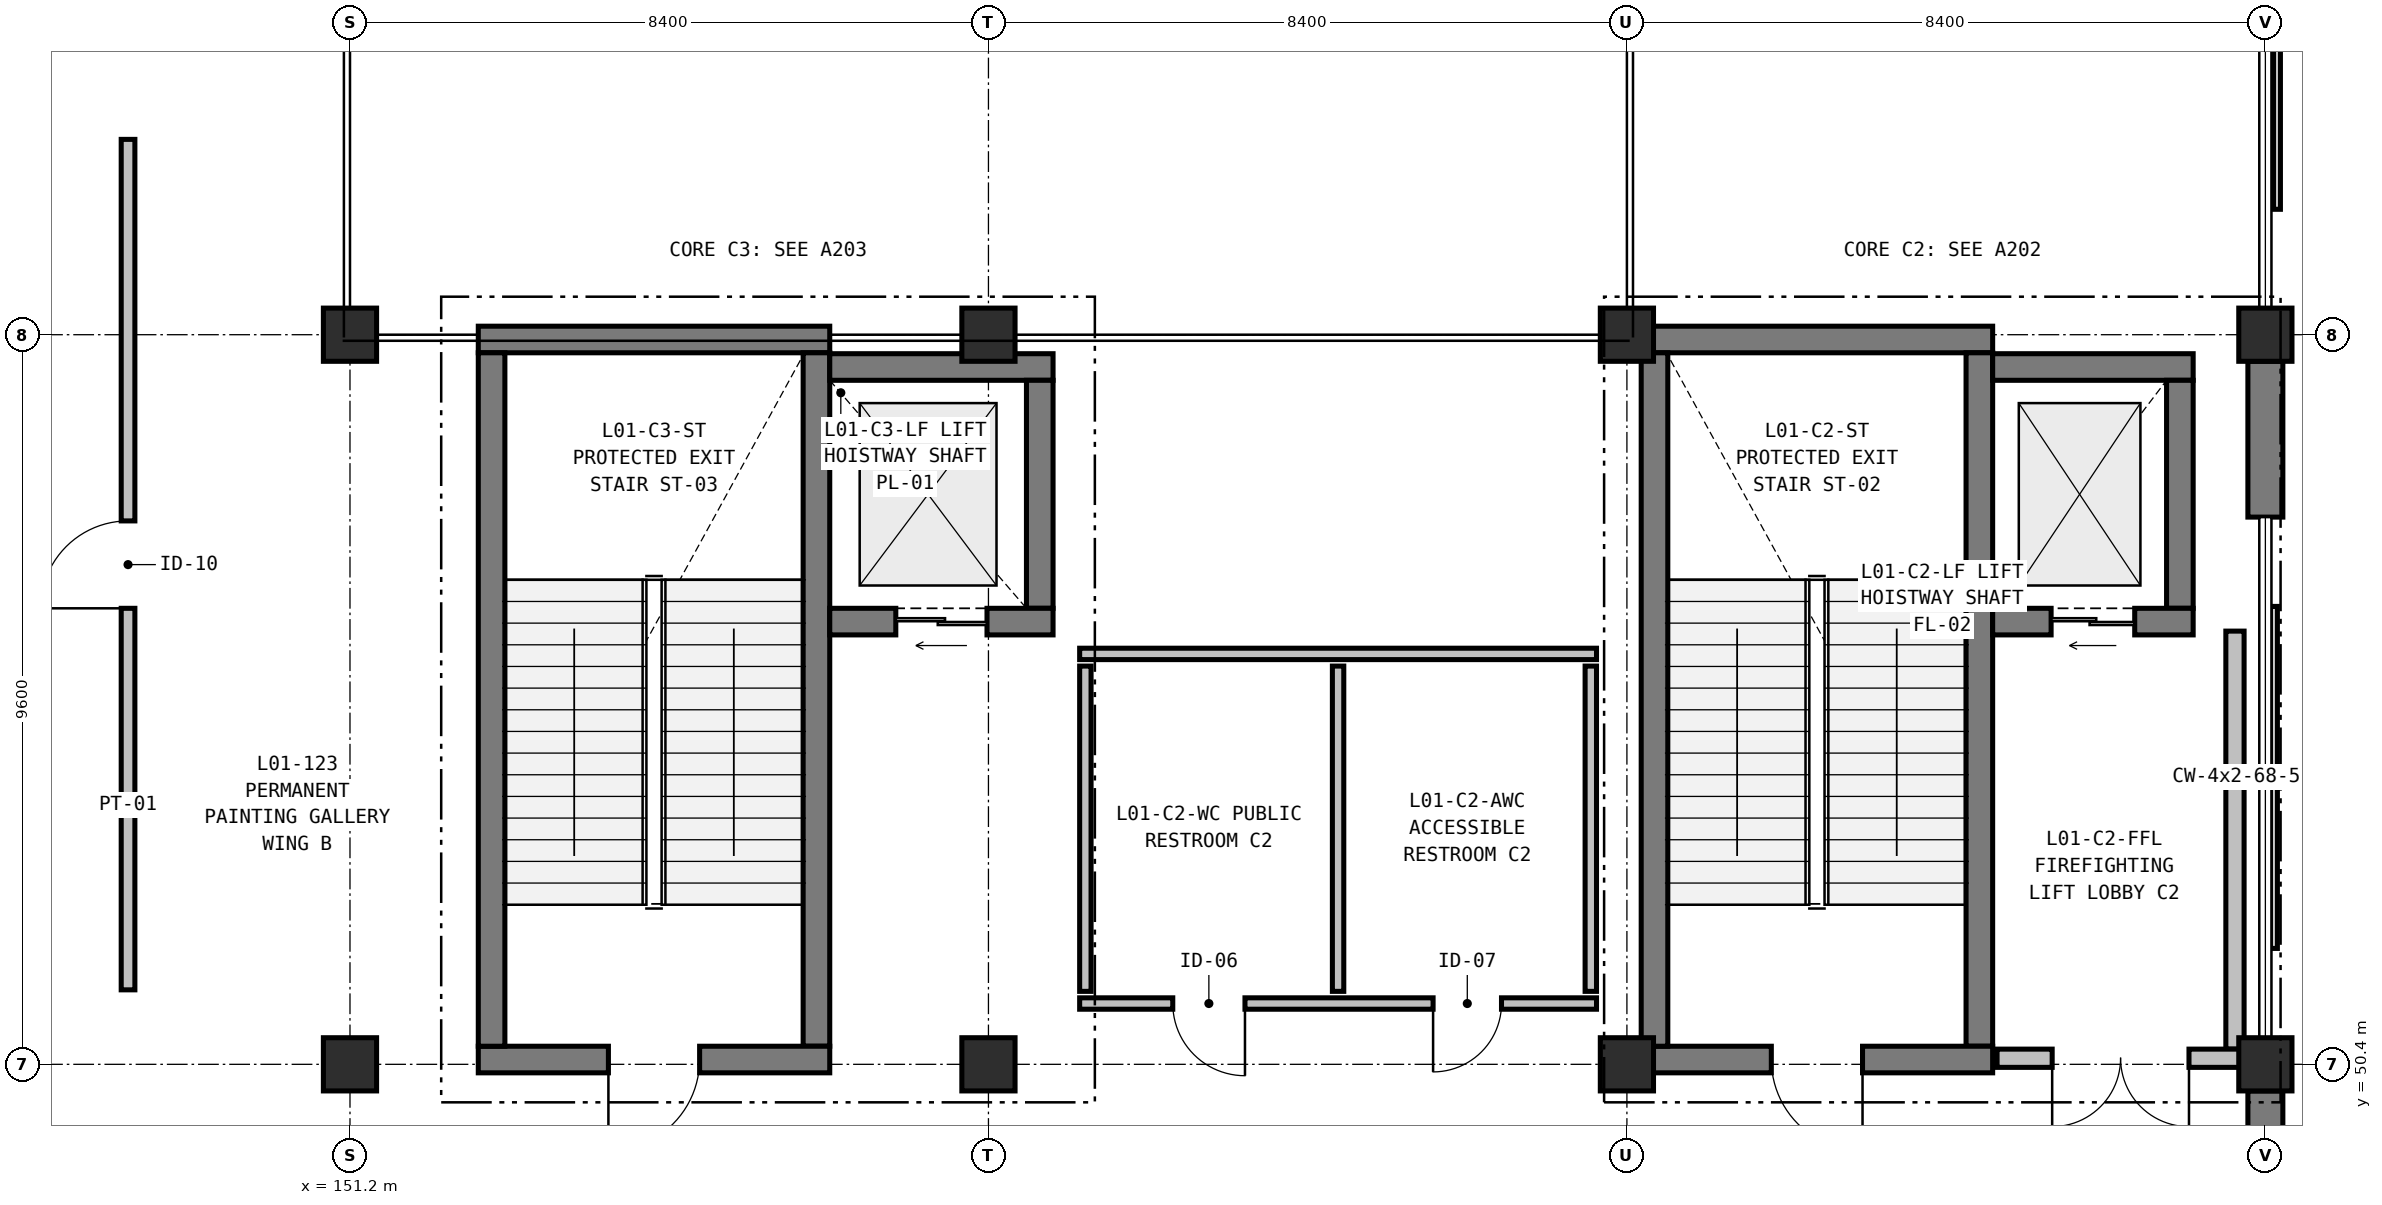
"""IFC4 building model, lengths in metres.
Left out: names, types, materials, properties, quantities, classifications, styles, units other than length and angle.
Written with IfcOpenShell. Run it as: python <this file> out.ifc"""

import sys

from ifc_helpers import new_model, si_unit, direction, frame, frame_2d, origin, origin_2d, place, context, subcontext, project, spatial, rectangle, extrude, element, fill, save


model = new_model("IFC4")
c1 = context("Model", 3, precision=1e-05, world=origin(), true_north=direction((0.0, 1.0)))
c2 = subcontext(c1, "Body", "Model", "MODEL_VIEW")
j1 = project(units=[si_unit("LENGTHUNIT", "METRE"), si_unit("PLANEANGLEUNIT", "RADIAN")], contexts=[c1])
p1 = place(None, origin())
s1 = spatial("IfcSite", under=j1, at=p1, CompositionType="ELEMENT")
p2 = place(p1, origin())
s2 = spatial("IfcBuilding", under=s1, at=p2, CompositionType="ELEMENT")
p3 = place(p2, frame((0.0, 0.0, 6.0)))
s3 = spatial("IfcBuildingStorey", under=s2, at=p3, CompositionType="ELEMENT", Elevation=6.0)
for number, where, z_axis, x_axis in (
    (1, (151.2, 50.4, 0.0), (0.0, 0.0, 1.0), (1.0, 0.0, 0.0)),
    (2, (151.2, 60.0, 0.0), (0.0, 0.0, 1.0), (1.0, 0.0, 0.0)),
    (3, (159.6, 50.4, 0.0), (0.0, 0.0, 1.0), (1.0, 0.0, 0.0)),
    (4, (159.6, 60.0, 0.0), (0.0, 0.0, 1.0), (1.0, 0.0, 0.0)),
    (5, (168.0, 50.4, 0.0), (0.0, 0.0, 1.0), (1.0, 0.0, 0.0)),
    (6, (168.0, 60.0, 0.0), (0.0, 0.0, 1.0), (1.0, 0.0, 0.0)),
    (7, (176.4, 50.4, 0.0), (0.0, 0.0, 1.0), (1.0, 0.0, 0.0)),
    (8, (176.4, 60.0, 0.0), (0.0, 0.0, 1.0), (1.0, 0.0, 0.0)),
):
    element("IfcColumn", number, at=place(p3, frame(where, z_axis=z_axis, x_axis=x_axis)), inside=s3, PredefinedType="COLUMN", context=c2, shape_type="SweptSolid", body=[
        extrude(rectangle(XDim=0.7, YDim=0.7, at=origin_2d()), origin(), (0.0, 0.0, 1.0), 5.4),
    ])
p4 = place(p3, frame((176.4, 59.65, 0.0), z_axis=(0.0, 0.0, 1.0), x_axis=(0.0, -1.0, 0.0)))
e9 = element("IfcWall", 9, at=p4, inside=s3, PredefinedType="SOLIDWALL", context=c2, shape_type="SweptSolid", body=[
    extrude(rectangle(XDim=2.05, YDim=0.46, at=frame_2d((1.025, 0.0))), origin(), (0.0, 0.0, 1.0), 5.08),
])
p5 = place(p3, frame((176.4, 50.05, 0.0), z_axis=(0.0, 0.0, 1.0), x_axis=(0.0, -1.0, 0.0)))
e10 = element("IfcWall", 10, at=p5, inside=s3, PredefinedType="SOLIDWALL", context=c2, shape_type="SweptSolid", body=[
    extrude(rectangle(XDim=4.1, YDim=0.46, at=frame_2d((2.05, 0.0))), origin(), (0.0, 0.0, 1.0), 5.08),
])
p6 = place(p3, frame((168.188, 59.937, 0.0), z_axis=(0.0, 0.0, 1.0), x_axis=(1.0, 0.0, 0.0)))
e11 = element("IfcWall", 11, at=p6, inside=s3, PredefinedType="SHEAR", context=c2, shape_type="SweptSolid", body=[
    extrude(rectangle(XDim=4.624, YDim=0.35, at=frame_2d((2.312, 0.0))), origin(), (0.0, 0.0, 1.0), 5.08),
])
p7 = place(p3, frame((172.637, 59.762, 0.0), z_axis=(0.0, 0.0, 1.0), x_axis=(0.0, -1.0, 0.0)))
e12 = element("IfcWall", 12, at=p7, inside=s3, PredefinedType="SHEAR", context=c2, shape_type="SweptSolid", body=[
    extrude(rectangle(XDim=9.124, YDim=0.35, at=frame_2d((4.562, 0.0))), origin(), (0.0, 0.0, 1.0), 5.08),
])
p8 = place(p3, frame((172.812, 50.463, 0.0), z_axis=(0.0, 0.0, 1.0), x_axis=(-1.0, 0.0, 0.0)))
e13 = element("IfcWall", 13, at=p8, inside=s3, PredefinedType="SHEAR", context=c2, shape_type="SweptSolid", body=[
    extrude(rectangle(XDim=4.624, YDim=0.35, at=frame_2d((2.312, 0.0))), origin(), (0.0, 0.0, 1.0), 5.08),
])
p9 = place(p8, frame((1.712, 0.0, 0.0)))
e14 = element("IfcOpeningElement", 14, at=p9, cuts=e13, PredefinedType="OPENING", context=c2, shape_type="SweptSolid", body=[
    extrude(rectangle(XDim=1.2, YDim=2.2, at=frame_2d((0.6, 1.1))), frame((0.0, 0.185, 0.0), z_axis=(0.0, -1.0, 0.0), x_axis=(1.0, 0.0, 0.0)), (0.0, 0.0, 1.0), 0.37),
])
p10 = place(p3, frame((168.363, 50.638, 0.0), z_axis=(0.0, 0.0, 1.0), x_axis=(0.0, 1.0, 0.0)))
e15 = element("IfcWall", 15, at=p10, inside=s3, PredefinedType="SHEAR", context=c2, shape_type="SweptSolid", body=[
    extrude(rectangle(XDim=9.124, YDim=0.35, at=frame_2d((4.562, 0.0))), origin(), (0.0, 0.0, 1.0), 5.08),
])
p11 = place(p3, frame((172.812, 59.575, 0.0), z_axis=(0.0, 0.0, 1.0), x_axis=(1.0, 0.0, 0.0)))
e16 = element("IfcWall", 16, at=p11, inside=s3, PredefinedType="SHEAR", context=c2, shape_type="SweptSolid", body=[
    extrude(rectangle(XDim=2.638, YDim=0.35, at=frame_2d((1.319, 0.0))), origin(), (0.0, 0.0, 1.0), 5.08),
])
p12 = place(p3, frame((175.275, 59.4, 0.0), z_axis=(0.0, 0.0, 1.0), x_axis=(0.0, -1.0, 0.0)))
e17 = element("IfcWall", 17, at=p12, inside=s3, PredefinedType="SHEAR", context=c2, shape_type="SweptSolid", body=[
    extrude(rectangle(XDim=3.0, YDim=0.35, at=frame_2d((1.5, 0.0))), origin(), (0.0, 0.0, 1.0), 5.08),
])
p13 = place(p3, frame((175.45, 56.225, 0.0), z_axis=(0.0, 0.0, 1.0), x_axis=(-1.0, 0.0, 0.0)))
e18 = element("IfcWall", 18, at=p13, inside=s3, PredefinedType="SHEAR", context=c2, shape_type="SweptSolid", body=[
    extrude(rectangle(XDim=2.638, YDim=0.35, at=frame_2d((1.319, 0.0))), origin(), (0.0, 0.0, 1.0), 5.08),
])
p14 = place(p13, frame((0.769, 0.0, 0.0)))
e19 = element("IfcOpeningElement", 19, at=p14, cuts=e18, PredefinedType="OPENING", context=c2, shape_type="SweptSolid", body=[
    extrude(rectangle(XDim=1.1, YDim=2.2, at=frame_2d((0.55, 1.1))), frame((0.0, 0.185, 0.0), z_axis=(0.0, -1.0, 0.0), x_axis=(1.0, 0.0, 0.0)), (0.0, 0.0, 1.0), 0.37),
])
p15 = place(p3, frame((176.0, 56.1, 0.0), z_axis=(0.0, 0.0, 1.0), x_axis=(0.0, -1.0, 0.0)))
e20 = element("IfcWall", 20, at=p15, inside=s3, PredefinedType="PARTITIONING", context=c2, shape_type="SweptSolid", body=[
    extrude(rectangle(XDim=5.5, YDim=0.24, at=frame_2d((2.75, 0.0))), origin(), (0.0, 0.0, 1.0), 4.405),
])
p16 = place(p3, frame((176.12, 50.48, 0.0), z_axis=(0.0, 0.0, 1.0), x_axis=(-1.0, 0.0, 0.0)))
e21 = element("IfcWall", 21, at=p16, inside=s3, PredefinedType="PARTITIONING", context=c2, shape_type="SweptSolid", body=[
    extrude(rectangle(XDim=3.25, YDim=0.24, at=frame_2d((1.625, 0.0))), origin(), (0.0, 0.0, 1.0), 4.405),
])
p17 = place(p16, frame((0.725, 0.0, 0.0)))
e22 = element("IfcOpeningElement", 22, at=p17, cuts=e21, PredefinedType="OPENING", context=c2, shape_type="SweptSolid", body=[
    extrude(rectangle(XDim=1.8, YDim=2.25, at=frame_2d((0.9, 1.125))), frame((0.0, 0.13, 0.0), z_axis=(0.0, -1.0, 0.0), x_axis=(1.0, 0.0, 0.0)), (0.0, 0.0, 1.0), 0.26),
])
p18 = place(p3, frame((167.6, 51.2, 0.0), z_axis=(0.0, 0.0, 1.0), x_axis=(-1.0, 0.0, 0.0)))
e23 = element("IfcWall", 23, at=p18, inside=s3, PredefinedType="PARTITIONING", context=c2, shape_type="SweptSolid", body=[
    extrude(rectangle(XDim=6.8, YDim=0.15, at=frame_2d((3.4, 0.0))), origin(), (0.0, 0.0, 1.0), 5.08),
])
p19 = place(p18, frame((1.25, 0.0, 0.0)))
e24 = element("IfcOpeningElement", 24, at=p19, cuts=e23, PredefinedType="OPENING", context=c2, shape_type="SweptSolid", body=[
    extrude(rectangle(XDim=0.9, YDim=2.1, at=frame_2d((0.45, 1.05))), frame((0.0, 0.085, 0.0), z_axis=(0.0, -1.0, 0.0), x_axis=(1.0, 0.0, 0.0)), (0.0, 0.0, 1.0), 0.17),
])
p20 = place(p18, frame((4.625, 0.0, 0.0)))
e25 = element("IfcOpeningElement", 25, at=p20, cuts=e23, PredefinedType="OPENING", context=c2, shape_type="SweptSolid", body=[
    extrude(rectangle(XDim=0.95, YDim=2.15, at=frame_2d((0.475, 1.075))), frame((0.0, 0.085, 0.0), z_axis=(0.0, -1.0, 0.0), x_axis=(1.0, 0.0, 0.0)), (0.0, 0.0, 1.0), 0.17),
])
p21 = place(p3, frame((160.8, 55.8, 0.0), z_axis=(0.0, 0.0, 1.0), x_axis=(1.0, 0.0, 0.0)))
e26 = element("IfcWall", 26, at=p21, inside=s3, PredefinedType="PARTITIONING", context=c2, shape_type="SweptSolid", body=[
    extrude(rectangle(XDim=6.8, YDim=0.15, at=frame_2d((3.4, 0.0))), origin(), (0.0, 0.0, 1.0), 5.08),
])
for number, where, z_axis, x_axis in (
    (27, (160.875, 51.36, 0.0), (0.0, 0.0, 1.0), (0.0, 1.0, 0.0)),
    (28, (164.2, 51.36, 0.0), (0.0, 0.0, 1.0), (0.0, 1.0, 0.0)),
    (29, (167.525, 51.36, 0.0), (0.0, 0.0, 1.0), (0.0, 1.0, 0.0)),
):
    element("IfcWall", number, at=place(p3, frame(where, z_axis=z_axis, x_axis=x_axis)), inside=s3, PredefinedType="PARTITIONING", context=c2, shape_type="SweptSolid", body=[
        extrude(rectangle(XDim=4.28, YDim=0.15, at=frame_2d((2.14, 0.0))), origin(), (0.0, 0.0, 1.0), 5.08),
    ])
p22 = place(p3, frame((152.888, 59.937, 0.0), z_axis=(0.0, 0.0, 1.0), x_axis=(1.0, 0.0, 0.0)))
e30 = element("IfcWall", 30, at=p22, inside=s3, PredefinedType="SHEAR", context=c2, shape_type="SweptSolid", body=[
    extrude(rectangle(XDim=4.624, YDim=0.35, at=frame_2d((2.312, 0.0))), origin(), (0.0, 0.0, 1.0), 5.08),
])
p23 = place(p3, frame((157.337, 59.762, 0.0), z_axis=(0.0, 0.0, 1.0), x_axis=(0.0, -1.0, 0.0)))
e31 = element("IfcWall", 31, at=p23, inside=s3, PredefinedType="SHEAR", context=c2, shape_type="SweptSolid", body=[
    extrude(rectangle(XDim=9.124, YDim=0.35, at=frame_2d((4.562, 0.0))), origin(), (0.0, 0.0, 1.0), 5.08),
])
p24 = place(p3, frame((157.512, 50.463, 0.0), z_axis=(0.0, 0.0, 1.0), x_axis=(-1.0, 0.0, 0.0)))
e32 = element("IfcWall", 32, at=p24, inside=s3, PredefinedType="SHEAR", context=c2, shape_type="SweptSolid", body=[
    extrude(rectangle(XDim=4.624, YDim=0.35, at=frame_2d((2.312, 0.0))), origin(), (0.0, 0.0, 1.0), 5.08),
])
p25 = place(p24, frame((1.712, 0.0, 0.0)))
e33 = element("IfcOpeningElement", 33, at=p25, cuts=e32, PredefinedType="OPENING", context=c2, shape_type="SweptSolid", body=[
    extrude(rectangle(XDim=1.2, YDim=2.2, at=frame_2d((0.6, 1.1))), frame((0.0, 0.185, 0.0), z_axis=(0.0, -1.0, 0.0), x_axis=(1.0, 0.0, 0.0)), (0.0, 0.0, 1.0), 0.37),
])
p26 = place(p3, frame((153.063, 50.638, 0.0), z_axis=(0.0, 0.0, 1.0), x_axis=(0.0, 1.0, 0.0)))
e34 = element("IfcWall", 34, at=p26, inside=s3, PredefinedType="SHEAR", context=c2, shape_type="SweptSolid", body=[
    extrude(rectangle(XDim=9.124, YDim=0.35, at=frame_2d((4.562, 0.0))), origin(), (0.0, 0.0, 1.0), 5.08),
])
p27 = place(p3, frame((157.512, 59.575, 0.0), z_axis=(0.0, 0.0, 1.0), x_axis=(1.0, 0.0, 0.0)))
e35 = element("IfcWall", 35, at=p27, inside=s3, PredefinedType="SHEAR", context=c2, shape_type="SweptSolid", body=[
    extrude(rectangle(XDim=2.938, YDim=0.35, at=frame_2d((1.469, 0.0))), origin(), (0.0, 0.0, 1.0), 5.08),
])
p28 = place(p3, frame((160.275, 59.4, 0.0), z_axis=(0.0, 0.0, 1.0), x_axis=(0.0, -1.0, 0.0)))
e36 = element("IfcWall", 36, at=p28, inside=s3, PredefinedType="SHEAR", context=c2, shape_type="SweptSolid", body=[
    extrude(rectangle(XDim=3.0, YDim=0.35, at=frame_2d((1.5, 0.0))), origin(), (0.0, 0.0, 1.0), 5.08),
])
p29 = place(p3, frame((160.45, 56.225, 0.0), z_axis=(0.0, 0.0, 1.0), x_axis=(-1.0, 0.0, 0.0)))
e37 = element("IfcWall", 37, at=p29, inside=s3, PredefinedType="SHEAR", context=c2, shape_type="SweptSolid", body=[
    extrude(rectangle(XDim=2.938, YDim=0.35, at=frame_2d((1.469, 0.0))), origin(), (0.0, 0.0, 1.0), 5.08),
])
p30 = place(p29, frame((0.869, 0.0, 0.0)))
e38 = element("IfcOpeningElement", 38, at=p30, cuts=e37, PredefinedType="OPENING", context=c2, shape_type="SweptSolid", body=[
    extrude(rectangle(XDim=1.2, YDim=2.2, at=frame_2d((0.6, 1.1))), frame((0.0, 0.185, 0.0), z_axis=(0.0, -1.0, 0.0), x_axis=(1.0, 0.0, 0.0)), (0.0, 0.0, 1.0), 0.37),
])
p31 = place(p3, frame((148.28, 51.38, 0.0), z_axis=(0.0, 0.0, 1.0), x_axis=(0.0, 1.0, 0.0)))
e39 = element("IfcWall", 39, at=p31, inside=s3, PredefinedType="PARTITIONING", context=c2, shape_type="SweptSolid", body=[
    extrude(rectangle(XDim=11.19, YDim=0.18, at=frame_2d((5.595, 0.0))), origin(), (0.0, 0.0, 1.0), 4.405),
])
p32 = place(p31, frame((5.02, 0.0, 0.0)))
e40 = element("IfcOpeningElement", 40, at=p32, cuts=e39, PredefinedType="OPENING", context=c2, shape_type="SweptSolid", body=[
    extrude(rectangle(XDim=1.15, YDim=2.2, at=frame_2d((0.575, 1.1))), frame((0.0, 0.1, 0.0), z_axis=(0.0, -1.0, 0.0), x_axis=(1.0, 0.0, 0.0)), (0.0, 0.0, 1.0), 0.2),
])
p33 = place(p9, origin())
e41 = element("IfcDoor", 41, at=p33, inside=s3, OperationType="SINGLE_SWING_LEFT", PredefinedType="DOOR", context=c2, shape_type="SweptSolid", body=[
    extrude(rectangle(XDim=1.2, YDim=2.2, at=frame_2d((0.6, 1.1))), frame((0.0, 0.025, 0.0), z_axis=(0.0, -1.0, 0.0), x_axis=(1.0, 0.0, 0.0)), (0.0, 0.0, 1.0), 0.05),
])
fill(e14, e41)
p34 = place(p14, origin())
e42 = element("IfcDoor", 42, at=p34, inside=s3, OperationType="DOUBLE_DOOR_SLIDING", PredefinedType="DOOR", context=c2, shape_type="SweptSolid", body=[
    extrude(rectangle(XDim=1.1, YDim=2.2, at=frame_2d((0.55, 1.1))), frame((0.0, 0.025, 0.0), z_axis=(0.0, -1.0, 0.0), x_axis=(1.0, 0.0, 0.0)), (0.0, 0.0, 1.0), 0.05),
])
fill(e19, e42)
p35 = place(p17, origin())
e43 = element("IfcDoor", 43, at=p35, inside=s3, OperationType="DOUBLE_DOOR_SINGLE_SWING", PredefinedType="DOOR", context=c2, shape_type="SweptSolid", body=[
    extrude(rectangle(XDim=1.8, YDim=2.25, at=frame_2d((0.9, 1.125))), frame((0.0, 0.025, 0.0), z_axis=(0.0, -1.0, 0.0), x_axis=(1.0, 0.0, 0.0)), (0.0, 0.0, 1.0), 0.05),
])
fill(e22, e43)
p36 = place(p19, origin())
e44 = element("IfcDoor", 44, at=p36, inside=s3, OperationType="SINGLE_SWING_RIGHT", PredefinedType="DOOR", context=c2, shape_type="SweptSolid", body=[
    extrude(rectangle(XDim=0.9, YDim=2.1, at=frame_2d((0.45, 1.05))), frame((0.0, 0.025, 0.0), z_axis=(0.0, -1.0, 0.0), x_axis=(1.0, 0.0, 0.0)), (0.0, 0.0, 1.0), 0.05),
])
fill(e24, e44)
p37 = place(p20, origin())
e45 = element("IfcDoor", 45, at=p37, inside=s3, OperationType="SINGLE_SWING_LEFT", PredefinedType="DOOR", context=c2, shape_type="SweptSolid", body=[
    extrude(rectangle(XDim=0.95, YDim=2.15, at=frame_2d((0.475, 1.075))), frame((0.0, 0.025, 0.0), z_axis=(0.0, -1.0, 0.0), x_axis=(1.0, 0.0, 0.0)), (0.0, 0.0, 1.0), 0.05),
])
fill(e25, e45)
p38 = place(p25, origin())
e46 = element("IfcDoor", 46, at=p38, inside=s3, OperationType="SINGLE_SWING_RIGHT", PredefinedType="DOOR", context=c2, shape_type="SweptSolid", body=[
    extrude(rectangle(XDim=1.2, YDim=2.2, at=frame_2d((0.6, 1.1))), frame((0.0, 0.025, 0.0), z_axis=(0.0, -1.0, 0.0), x_axis=(1.0, 0.0, 0.0)), (0.0, 0.0, 1.0), 0.05),
])
fill(e33, e46)
p39 = place(p30, origin())
e47 = element("IfcDoor", 47, at=p39, inside=s3, OperationType="DOUBLE_DOOR_SLIDING", PredefinedType="DOOR", context=c2, shape_type="SweptSolid", body=[
    extrude(rectangle(XDim=1.2, YDim=2.2, at=frame_2d((0.6, 1.1))), frame((0.0, 0.025, 0.0), z_axis=(0.0, -1.0, 0.0), x_axis=(1.0, 0.0, 0.0)), (0.0, 0.0, 1.0), 0.05),
])
fill(e38, e47)
p40 = place(p32, origin())
e48 = element("IfcDoor", 48, at=p40, inside=s3, OperationType="SINGLE_SWING_LEFT", PredefinedType="DOOR", context=c2, shape_type="SweptSolid", body=[
    extrude(rectangle(XDim=1.15, YDim=2.2, at=frame_2d((0.575, 1.1))), frame((0.0, 0.025, 0.0), z_axis=(0.0, -1.0, 0.0), x_axis=(1.0, 0.0, 0.0)), (0.0, 0.0, 1.0), 0.05),
])
fill(e40, e48)
save(model, sys.argv[1])
